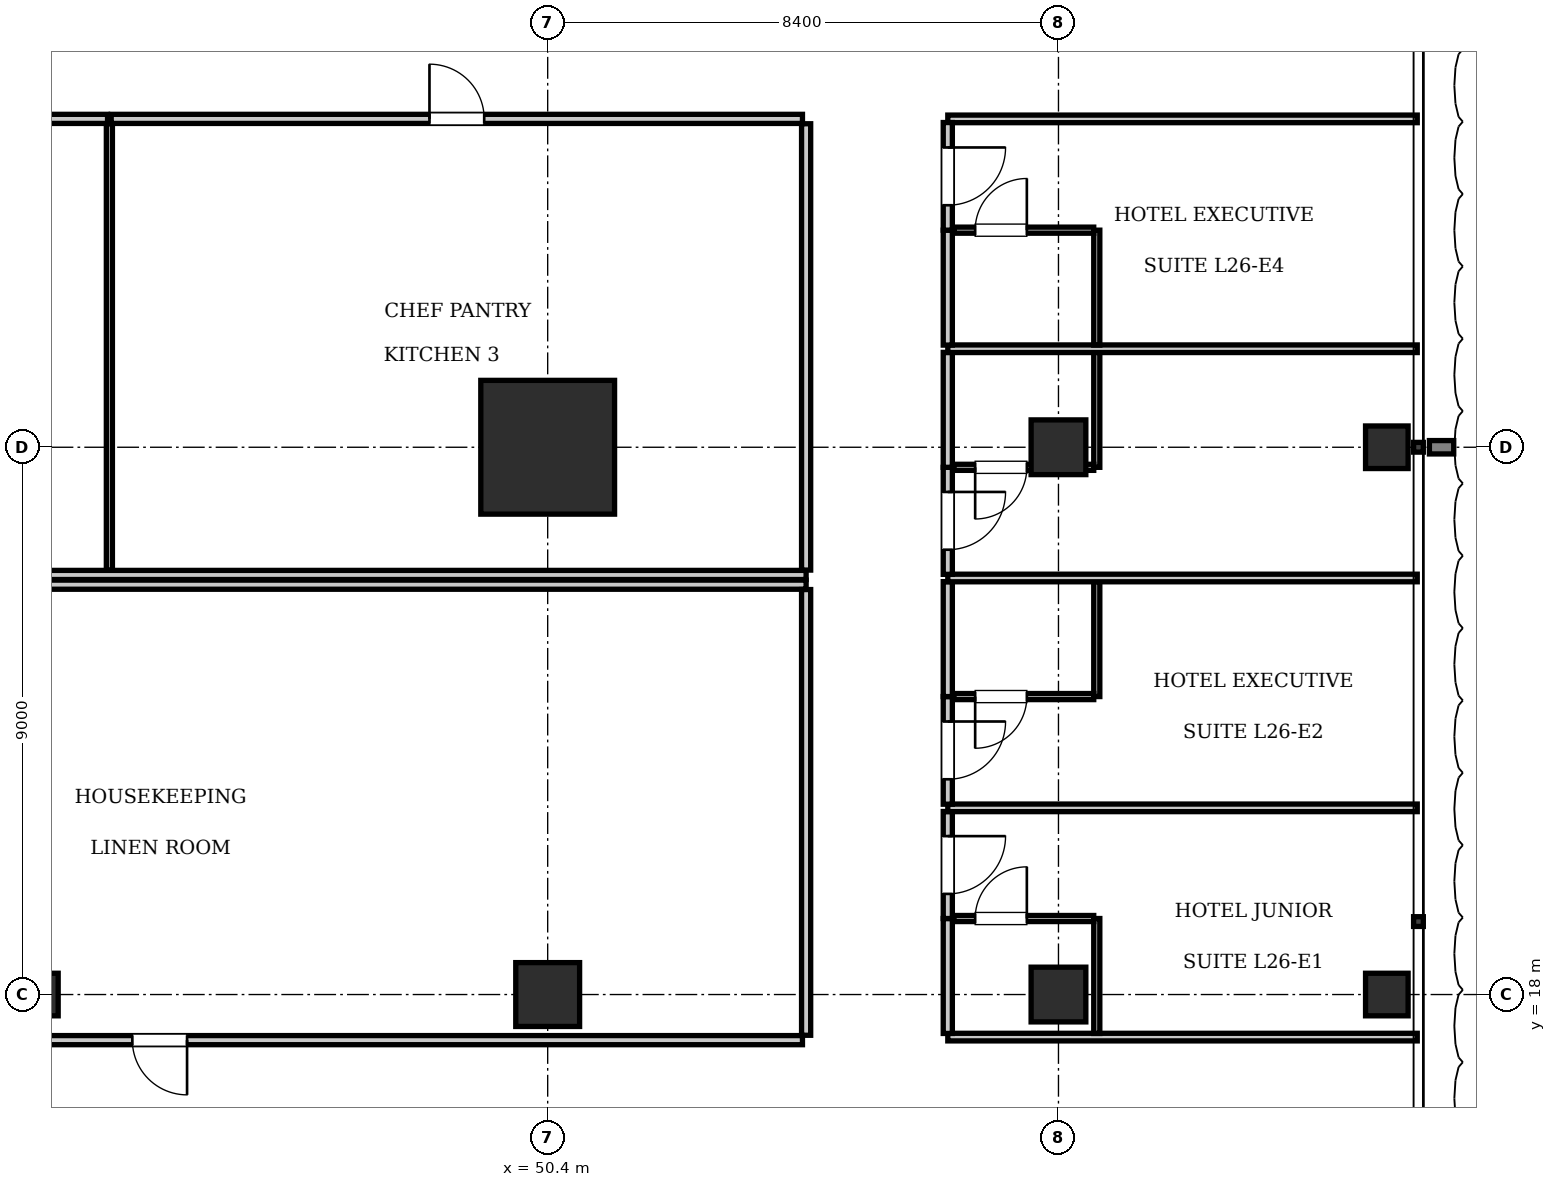
"""IFC4 building model, lengths in metres.
Left out: names, types, materials, properties, quantities, classifications, styles, units other than length and angle.
Written with IfcOpenShell. Run it as: python <this file> out.ifc"""

import sys

from ifc_helpers import new_model, si_unit, direction, frame, frame_2d, origin, origin_2d, place, context, subcontext, project, spatial, rectangle, i_section, extrude, element, fill, save


model = new_model("IFC4")
c1 = context("Model", 3, precision=1e-05, world=origin(), true_north=direction((0.0, 1.0)))
c2 = subcontext(c1, "Body", "Model", "MODEL_VIEW")
j1 = project(units=[si_unit("LENGTHUNIT", "METRE"), si_unit("PLANEANGLEUNIT", "RADIAN")], contexts=[c1])
p1 = place(None, origin())
s1 = spatial("IfcSite", under=j1, at=p1, CompositionType="ELEMENT")
p2 = place(p1, origin())
s2 = spatial("IfcBuilding", under=s1, at=p2, CompositionType="ELEMENT")
p3 = place(p2, frame((0.0, 0.0, 107.8)))
s3 = spatial("IfcBuildingStorey", under=s2, at=p3, CompositionType="ELEMENT", Elevation=107.8)
p4 = place(p3, frame((50.4, 27.0, 0.0), z_axis=(0.0, 0.0, 1.0), x_axis=(1.0, 0.0, 0.0)))
e1 = element("IfcColumn", 1, at=p4, inside=s3, PredefinedType="COLUMN", context=c2, shape_type="SweptSolid", body=[
    extrude(rectangle(XDim=2.2, YDim=2.2, at=origin_2d()), origin(), (0.0, 0.0, 1.0), 3.85),
])
p5 = place(p3, frame((50.4, 18.0, 0.0), z_axis=(0.0, 0.0, 1.0), x_axis=(1.0, 0.0, 0.0)))
e2 = element("IfcColumn", 2, at=p5, inside=s3, PredefinedType="COLUMN", context=c2, shape_type="SweptSolid", body=[
    extrude(rectangle(XDim=1.05, YDim=1.05, at=origin_2d()), origin(), (0.0, 0.0, 1.0), 3.85),
])
p6 = place(p3, frame((42.0, 18.0, 0.0), z_axis=(0.0, 0.0, 1.0), x_axis=(1.0, 0.0, 0.0)))
e3 = element("IfcColumn", 3, at=p6, inside=s3, PredefinedType="COLUMN", context=c2, shape_type="SweptSolid", body=[
    extrude(i_section(OverallWidth=0.7, OverallDepth=0.7, WebThickness=0.028, FlangeThickness=0.044, at=origin_2d()), origin(), (0.0, 0.0, 1.0), 3.85),
])
for number, where, z_axis, x_axis in (
    (4, (58.8, 18.0, 0.0), (0.0, 0.0, 1.0), (1.0, 0.0, 0.0)),
    (5, (58.8, 27.0, 0.0), (0.0, 0.0, 1.0), (1.0, 0.0, 0.0)),
):
    element("IfcColumn", number, at=place(p3, frame(where, z_axis=z_axis, x_axis=x_axis)), inside=s3, PredefinedType="COLUMN", context=c2, shape_type="SweptSolid", body=[
        extrude(rectangle(XDim=0.9, YDim=0.9, at=origin_2d()), origin(), (0.0, 0.0, 1.0), 3.85),
    ])
for number, where, z_axis, x_axis in (
    (6, (64.2, 18.0, 0.0), (0.0, 0.0, 1.0), (1.0, 0.0, 0.0)),
    (7, (64.2, 27.0, 0.0), (0.0, 0.0, 1.0), (1.0, 0.0, 0.0)),
):
    element("IfcColumn", number, at=place(p3, frame(where, z_axis=z_axis, x_axis=x_axis)), inside=s3, PredefinedType="COLUMN", context=c2, shape_type="SweptSolid", body=[
        extrude(i_section(OverallWidth=0.7, OverallDepth=0.7, WebThickness=0.028, FlangeThickness=0.044, at=origin_2d()), origin(), (0.0, 0.0, 1.0), 3.85),
    ])
p7 = place(p3, frame((20.95, 24.9, 0.0), z_axis=(0.0, 0.0, 1.0), x_axis=(1.0, 0.0, 0.0)))
e8 = element("IfcWall", 8, at=p7, inside=s3, PredefinedType="PARTITIONING", context=c2, shape_type="SweptSolid", body=[
    extrude(rectangle(XDim=33.7, YDim=0.15, at=frame_2d((16.85, 0.0))), origin(), (0.0, 0.0, 1.0), 3.61),
])
p8 = place(p3, frame((54.65, 24.98, 0.0), z_axis=(0.0, 0.0, 1.0), x_axis=(0.0, 1.0, 0.0)))
e9 = element("IfcWall", 9, at=p8, inside=s3, PredefinedType="PARTITIONING", context=c2, shape_type="SweptSolid", body=[
    extrude(rectangle(XDim=7.34, YDim=0.15, at=frame_2d((3.67, 0.0))), origin(), (0.0, 0.0, 1.0), 3.3),
])
p9 = place(p3, frame((33.786, 32.4, 0.0), z_axis=(0.0, 0.0, 1.0), x_axis=(1.0, 0.0, 0.0)))
e10 = element("IfcWall", 10, at=p9, inside=s3, PredefinedType="PARTITIONING", context=c2, shape_type="SweptSolid", body=[
    extrude(rectangle(XDim=9.376, YDim=0.15, at=frame_2d((4.688, 0.0))), origin(), (0.0, 0.0, 1.0), 3.61),
])
p10 = place(p9, frame((4.238, 0.0, 0.0)))
e11 = element("IfcOpeningElement", 11, at=p10, cuts=e10, PredefinedType="OPENING", context=c2, shape_type="SweptSolid", body=[
    extrude(rectangle(XDim=0.9, YDim=2.1, at=frame_2d((0.45, 1.05))), frame((0.0, 0.085, 0.0), z_axis=(0.0, -1.0, 0.0), x_axis=(1.0, 0.0, 0.0)), (0.0, 0.0, 1.0), 0.17),
])
p11 = place(p3, frame((43.192, 24.98, 0.0), z_axis=(0.0, 0.0, 1.0), x_axis=(0.0, 1.0, 0.0)))
e12 = element("IfcWall", 12, at=p11, inside=s3, PredefinedType="PARTITIONING", context=c2, shape_type="SweptSolid", body=[
    extrude(rectangle(XDim=7.34, YDim=0.1, at=frame_2d((3.67, 0.0))), origin(), (0.0, 0.0, 1.0), 3.61),
])
p12 = place(p3, frame((43.222, 32.4, 0.0), z_axis=(0.0, 0.0, 1.0), x_axis=(1.0, 0.0, 0.0)))
e13 = element("IfcWall", 13, at=p12, inside=s3, PredefinedType="PARTITIONING", context=c2, shape_type="SweptSolid", body=[
    extrude(rectangle(XDim=11.368, YDim=0.15, at=frame_2d((5.684, 0.0))), origin(), (0.0, 0.0, 1.0), 3.61),
])
p13 = place(p12, frame((5.234, 0.0, 0.0)))
e14 = element("IfcOpeningElement", 14, at=p13, cuts=e13, PredefinedType="OPENING", context=c2, shape_type="SweptSolid", body=[
    extrude(rectangle(XDim=0.9, YDim=2.1, at=frame_2d((0.45, 1.05))), frame((0.0, 0.085, 0.0), z_axis=(0.0, -1.0, 0.0), x_axis=(1.0, 0.0, 0.0)), (0.0, 0.0, 1.0), 0.17),
])
p14 = place(p3, frame((20.95, 24.74, 0.0), z_axis=(0.0, 0.0, 1.0), x_axis=(1.0, 0.0, 0.0)))
e15 = element("IfcWall", 15, at=p14, inside=s3, PredefinedType="PARTITIONING", context=c2, shape_type="SweptSolid", body=[
    extrude(rectangle(XDim=33.7, YDim=0.15, at=frame_2d((16.85, 0.0))), origin(), (0.0, 0.0, 1.0), 3.61),
])
p15 = place(p3, frame((54.65, 17.33, 0.0), z_axis=(0.0, 0.0, 1.0), x_axis=(0.0, 1.0, 0.0)))
e16 = element("IfcWall", 16, at=p15, inside=s3, PredefinedType="PARTITIONING", context=c2, shape_type="SweptSolid", body=[
    extrude(rectangle(XDim=7.33, YDim=0.15, at=frame_2d((3.665, 0.0))), origin(), (0.0, 0.0, 1.0), 3.293),
])
p16 = place(p3, frame((33.449, 17.25, 0.0), z_axis=(0.0, 0.0, 1.0), x_axis=(1.0, 0.0, 0.0)))
e17 = element("IfcWall", 17, at=p16, inside=s3, PredefinedType="PARTITIONING", context=c2, shape_type="SweptSolid", body=[
    extrude(rectangle(XDim=21.141, YDim=0.15, at=frame_2d((10.571, 0.0))), origin(), (0.0, 0.0, 1.0), 3.61),
])
p17 = place(p16, frame((10.121, 0.0, 0.0)))
e18 = element("IfcOpeningElement", 18, at=p17, cuts=e17, PredefinedType="OPENING", context=c2, shape_type="SweptSolid", body=[
    extrude(rectangle(XDim=0.9, YDim=2.1, at=frame_2d((0.45, 1.05))), frame((0.0, 0.085, 0.0), z_axis=(0.0, -1.0, 0.0), x_axis=(1.0, 0.0, 0.0)), (0.0, 0.0, 1.0), 0.17),
])
for number, where, z_axis, x_axis in (
    (19, (56.98, 17.3, 0.0), (0.0, 0.0, 1.0), (1.0, 0.0, 0.0)),
    (20, (56.98, 32.4, 0.0), (0.0, 0.0, 1.0), (1.0, 0.0, 0.0)),
):
    element("IfcWall", number, at=place(p3, frame(where, z_axis=z_axis, x_axis=x_axis)), inside=s3, PredefinedType="PARTITIONING", context=c2, shape_type="SweptSolid", body=[
        extrude(rectangle(XDim=7.72, YDim=0.125, at=frame_2d((3.86, 0.0))), origin(), (0.0, 0.0, 1.0), 3.61),
    ])
p18 = place(p3, frame((56.98, 17.36, 0.0), z_axis=(0.0, 0.0, 1.0), x_axis=(0.0, 1.0, 0.0)))
e21 = element("IfcWall", 21, at=p18, inside=s3, PredefinedType="PARTITIONING", context=c2, shape_type="SweptSolid", body=[
    extrude(rectangle(XDim=1.89, YDim=0.15, at=frame_2d((0.945, 0.0))), origin(), (0.0, 0.0, 1.0), 3.61),
])
p19 = place(p3, frame((56.98, 19.25, 0.0), z_axis=(0.0, 0.0, 1.0), x_axis=(0.0, 1.0, 0.0)))
e22 = element("IfcWall", 22, at=p19, inside=s3, PredefinedType="PARTITIONING", context=c2, shape_type="SweptSolid", body=[
    extrude(rectangle(XDim=1.76, YDim=0.15, at=frame_2d((0.88, 0.0))), origin(), (0.0, 0.0, 1.0), 3.61),
])
p20 = place(p19, frame((0.405, 0.0, 0.0)))
e23 = element("IfcOpeningElement", 23, at=p20, cuts=e22, PredefinedType="OPENING", context=c2, shape_type="SweptSolid", body=[
    extrude(rectangle(XDim=0.95, YDim=2.15, at=frame_2d((0.475, 1.075))), frame((0.0, 0.085, 0.0), z_axis=(0.0, -1.0, 0.0), x_axis=(1.0, 0.0, 0.0)), (0.0, 0.0, 1.0), 0.17),
])
p21 = place(p3, frame((59.43, 17.36, 0.0), z_axis=(0.0, 0.0, 1.0), x_axis=(0.0, 1.0, 0.0)))
e24 = element("IfcWall", 24, at=p21, inside=s3, PredefinedType="PARTITIONING", context=c2, shape_type="SweptSolid", body=[
    extrude(rectangle(XDim=1.89, YDim=0.1, at=frame_2d((0.945, 0.0))), origin(), (0.0, 0.0, 1.0), 3.61),
])
p22 = place(p3, frame((57.08, 19.25, 0.0), z_axis=(0.0, 0.0, 1.0), x_axis=(1.0, 0.0, 0.0)))
e25 = element("IfcWall", 25, at=p22, inside=s3, PredefinedType="PARTITIONING", context=c2, shape_type="SweptSolid", body=[
    extrude(rectangle(XDim=2.3, YDim=0.1, at=frame_2d((1.15, 0.0))), origin(), (0.0, 0.0, 1.0), 3.61),
])
p23 = place(p22, frame((0.35, 0.0, 0.0)))
e26 = element("IfcOpeningElement", 26, at=p23, cuts=e25, PredefinedType="OPENING", context=c2, shape_type="SweptSolid", body=[
    extrude(rectangle(XDim=0.85, YDim=2.1, at=frame_2d((0.425, 1.05))), frame((0.0, 0.06, 0.0), z_axis=(0.0, -1.0, 0.0), x_axis=(1.0, 0.0, 0.0)), (0.0, 0.0, 1.0), 0.12),
])
p24 = place(p3, frame((56.98, 21.07, 0.0), z_axis=(0.0, 0.0, 1.0), x_axis=(1.0, 0.0, 0.0)))
e27 = element("IfcWall", 27, at=p24, inside=s3, PredefinedType="PARTITIONING", context=c2, shape_type="SweptSolid", body=[
    extrude(rectangle(XDim=7.72, YDim=0.125, at=frame_2d((3.86, 0.0))), origin(), (0.0, 0.0, 1.0), 3.61),
])
p25 = place(p3, frame((56.98, 21.13, 0.0), z_axis=(0.0, 0.0, 1.0), x_axis=(0.0, 1.0, 0.0)))
e28 = element("IfcWall", 28, at=p25, inside=s3, PredefinedType="PARTITIONING", context=c2, shape_type="SweptSolid", body=[
    extrude(rectangle(XDim=1.77, YDim=0.15, at=frame_2d((0.885, 0.0))), origin(), (0.0, 0.0, 1.0), 3.61),
])
p26 = place(p25, frame((0.41, 0.0, 0.0)))
e29 = element("IfcOpeningElement", 29, at=p26, cuts=e28, PredefinedType="OPENING", context=c2, shape_type="SweptSolid", body=[
    extrude(rectangle(XDim=0.95, YDim=2.15, at=frame_2d((0.475, 1.075))), frame((0.0, 0.085, 0.0), z_axis=(0.0, -1.0, 0.0), x_axis=(1.0, 0.0, 0.0)), (0.0, 0.0, 1.0), 0.17),
])
p27 = place(p3, frame((56.98, 22.9, 0.0), z_axis=(0.0, 0.0, 1.0), x_axis=(0.0, 1.0, 0.0)))
e30 = element("IfcWall", 30, at=p27, inside=s3, PredefinedType="PARTITIONING", context=c2, shape_type="SweptSolid", body=[
    extrude(rectangle(XDim=1.89, YDim=0.15, at=frame_2d((0.945, 0.0))), origin(), (0.0, 0.0, 1.0), 3.61),
])
p28 = place(p3, frame((59.43, 22.9, 0.0), z_axis=(0.0, 0.0, 1.0), x_axis=(0.0, 1.0, 0.0)))
e31 = element("IfcWall", 31, at=p28, inside=s3, PredefinedType="PARTITIONING", context=c2, shape_type="SweptSolid", body=[
    extrude(rectangle(XDim=1.89, YDim=0.1, at=frame_2d((0.945, 0.0))), origin(), (0.0, 0.0, 1.0), 3.61),
])
p29 = place(p3, frame((57.08, 22.9, 0.0), z_axis=(0.0, 0.0, 1.0), x_axis=(1.0, 0.0, 0.0)))
e32 = element("IfcWall", 32, at=p29, inside=s3, PredefinedType="PARTITIONING", context=c2, shape_type="SweptSolid", body=[
    extrude(rectangle(XDim=2.3, YDim=0.1, at=frame_2d((1.15, 0.0))), origin(), (0.0, 0.0, 1.0), 3.61),
])
p30 = place(p29, frame((0.35, 0.0, 0.0)))
e33 = element("IfcOpeningElement", 33, at=p30, cuts=e32, PredefinedType="OPENING", context=c2, shape_type="SweptSolid", body=[
    extrude(rectangle(XDim=0.85, YDim=2.1, at=frame_2d((0.425, 1.05))), frame((0.0, 0.06, 0.0), z_axis=(0.0, -1.0, 0.0), x_axis=(1.0, 0.0, 0.0)), (0.0, 0.0, 1.0), 0.12),
])
p31 = place(p3, frame((56.98, 24.85, 0.0), z_axis=(0.0, 0.0, 1.0), x_axis=(1.0, 0.0, 0.0)))
e34 = element("IfcWall", 34, at=p31, inside=s3, PredefinedType="PARTITIONING", context=c2, shape_type="SweptSolid", body=[
    extrude(rectangle(XDim=7.72, YDim=0.125, at=frame_2d((3.86, 0.0))), origin(), (0.0, 0.0, 1.0), 3.61),
])
p32 = place(p3, frame((56.98, 24.91, 0.0), z_axis=(0.0, 0.0, 1.0), x_axis=(0.0, 1.0, 0.0)))
e35 = element("IfcWall", 35, at=p32, inside=s3, PredefinedType="PARTITIONING", context=c2, shape_type="SweptSolid", body=[
    extrude(rectangle(XDim=1.76, YDim=0.15, at=frame_2d((0.88, 0.0))), origin(), (0.0, 0.0, 1.0), 3.61),
])
p33 = place(p32, frame((0.405, 0.0, 0.0)))
e36 = element("IfcOpeningElement", 36, at=p33, cuts=e35, PredefinedType="OPENING", context=c2, shape_type="SweptSolid", body=[
    extrude(rectangle(XDim=0.95, YDim=2.15, at=frame_2d((0.475, 1.075))), frame((0.0, 0.085, 0.0), z_axis=(0.0, -1.0, 0.0), x_axis=(1.0, 0.0, 0.0)), (0.0, 0.0, 1.0), 0.17),
])
p34 = place(p3, frame((56.98, 26.67, 0.0), z_axis=(0.0, 0.0, 1.0), x_axis=(0.0, 1.0, 0.0)))
e37 = element("IfcWall", 37, at=p34, inside=s3, PredefinedType="PARTITIONING", context=c2, shape_type="SweptSolid", body=[
    extrude(rectangle(XDim=1.89, YDim=0.15, at=frame_2d((0.945, 0.0))), origin(), (0.0, 0.0, 1.0), 3.61),
])
p35 = place(p3, frame((59.43, 26.67, 0.0), z_axis=(0.0, 0.0, 1.0), x_axis=(0.0, 1.0, 0.0)))
e38 = element("IfcWall", 38, at=p35, inside=s3, PredefinedType="PARTITIONING", context=c2, shape_type="SweptSolid", body=[
    extrude(rectangle(XDim=1.89, YDim=0.1, at=frame_2d((0.945, 0.0))), origin(), (0.0, 0.0, 1.0), 3.61),
])
p36 = place(p3, frame((57.08, 26.67, 0.0), z_axis=(0.0, 0.0, 1.0), x_axis=(1.0, 0.0, 0.0)))
e39 = element("IfcWall", 39, at=p36, inside=s3, PredefinedType="PARTITIONING", context=c2, shape_type="SweptSolid", body=[
    extrude(rectangle(XDim=2.3, YDim=0.1, at=frame_2d((1.15, 0.0))), origin(), (0.0, 0.0, 1.0), 3.61),
])
p37 = place(p36, frame((0.35, 0.0, 0.0)))
e40 = element("IfcOpeningElement", 40, at=p37, cuts=e39, PredefinedType="OPENING", context=c2, shape_type="SweptSolid", body=[
    extrude(rectangle(XDim=0.85, YDim=2.1, at=frame_2d((0.425, 1.05))), frame((0.0, 0.06, 0.0), z_axis=(0.0, -1.0, 0.0), x_axis=(1.0, 0.0, 0.0)), (0.0, 0.0, 1.0), 0.12),
])
p38 = place(p3, frame((56.98, 28.62, 0.0), z_axis=(0.0, 0.0, 1.0), x_axis=(1.0, 0.0, 0.0)))
e41 = element("IfcWall", 41, at=p38, inside=s3, PredefinedType="PARTITIONING", context=c2, shape_type="SweptSolid", body=[
    extrude(rectangle(XDim=7.72, YDim=0.125, at=frame_2d((3.86, 0.0))), origin(), (0.0, 0.0, 1.0), 3.61),
])
p39 = place(p3, frame((56.98, 28.68, 0.0), z_axis=(0.0, 0.0, 1.0), x_axis=(0.0, 1.0, 0.0)))
e42 = element("IfcWall", 42, at=p39, inside=s3, PredefinedType="PARTITIONING", context=c2, shape_type="SweptSolid", body=[
    extrude(rectangle(XDim=1.89, YDim=0.15, at=frame_2d((0.945, 0.0))), origin(), (0.0, 0.0, 1.0), 3.61),
])
p40 = place(p3, frame((56.98, 30.57, 0.0), z_axis=(0.0, 0.0, 1.0), x_axis=(0.0, 1.0, 0.0)))
e43 = element("IfcWall", 43, at=p40, inside=s3, PredefinedType="PARTITIONING", context=c2, shape_type="SweptSolid", body=[
    extrude(rectangle(XDim=1.77, YDim=0.15, at=frame_2d((0.885, 0.0))), origin(), (0.0, 0.0, 1.0), 3.61),
])
p41 = place(p40, frame((0.41, 0.0, 0.0)))
e44 = element("IfcOpeningElement", 44, at=p41, cuts=e43, PredefinedType="OPENING", context=c2, shape_type="SweptSolid", body=[
    extrude(rectangle(XDim=0.95, YDim=2.15, at=frame_2d((0.475, 1.075))), frame((0.0, 0.085, 0.0), z_axis=(0.0, -1.0, 0.0), x_axis=(1.0, 0.0, 0.0)), (0.0, 0.0, 1.0), 0.17),
])
p42 = place(p3, frame((59.43, 28.68, 0.0), z_axis=(0.0, 0.0, 1.0), x_axis=(0.0, 1.0, 0.0)))
e45 = element("IfcWall", 45, at=p42, inside=s3, PredefinedType="PARTITIONING", context=c2, shape_type="SweptSolid", body=[
    extrude(rectangle(XDim=1.89, YDim=0.1, at=frame_2d((0.945, 0.0))), origin(), (0.0, 0.0, 1.0), 3.61),
])
p43 = place(p3, frame((57.08, 30.57, 0.0), z_axis=(0.0, 0.0, 1.0), x_axis=(1.0, 0.0, 0.0)))
e46 = element("IfcWall", 46, at=p43, inside=s3, PredefinedType="PARTITIONING", context=c2, shape_type="SweptSolid", body=[
    extrude(rectangle(XDim=2.3, YDim=0.1, at=frame_2d((1.15, 0.0))), origin(), (0.0, 0.0, 1.0), 3.61),
])
p44 = place(p43, frame((0.35, 0.0, 0.0)))
e47 = element("IfcOpeningElement", 47, at=p44, cuts=e46, PredefinedType="OPENING", context=c2, shape_type="SweptSolid", body=[
    extrude(rectangle(XDim=0.85, YDim=2.1, at=frame_2d((0.425, 1.05))), frame((0.0, 0.06, 0.0), z_axis=(0.0, -1.0, 0.0), x_axis=(1.0, 0.0, 0.0)), (0.0, 0.0, 1.0), 0.12),
])
p45 = place(p13, origin())
e48 = element("IfcDoor", 48, at=p45, inside=s3, OperationType="SINGLE_SWING_LEFT", PredefinedType="DOOR", context=c2, shape_type="SweptSolid", body=[
    extrude(rectangle(XDim=0.9, YDim=2.1, at=frame_2d((0.45, 1.05))), frame((0.0, 0.025, 0.0), z_axis=(0.0, -1.0, 0.0), x_axis=(1.0, 0.0, 0.0)), (0.0, 0.0, 1.0), 0.05),
])
fill(e14, e48)
p46 = place(p17, frame((0.9, 0.0, 0.0), z_axis=(0.0, 0.0, 1.0), x_axis=(-1.0, 0.0, 0.0)))
e49 = element("IfcDoor", 49, at=p46, inside=s3, OperationType="SINGLE_SWING_LEFT", PredefinedType="DOOR", context=c2, shape_type="SweptSolid", body=[
    extrude(rectangle(XDim=0.9, YDim=2.1, at=frame_2d((0.45, 1.05))), frame((0.0, 0.025, 0.0), z_axis=(0.0, -1.0, 0.0), x_axis=(1.0, 0.0, 0.0)), (0.0, 0.0, 1.0), 0.05),
])
fill(e18, e49)
p47 = place(p23, origin())
e50 = element("IfcDoor", 50, at=p47, inside=s3, OperationType="SINGLE_SWING_RIGHT", PredefinedType="DOOR", context=c2, shape_type="SweptSolid", body=[
    extrude(rectangle(XDim=0.85, YDim=2.1, at=frame_2d((0.425, 1.05))), frame((0.0, 0.025, 0.0), z_axis=(0.0, -1.0, 0.0), x_axis=(1.0, 0.0, 0.0)), (0.0, 0.0, 1.0), 0.05),
])
fill(e26, e50)
p48 = place(p20, frame((0.95, 0.0, 0.0), z_axis=(0.0, 0.0, 1.0), x_axis=(-1.0, 0.0, 0.0)))
e51 = element("IfcDoor", 51, at=p48, inside=s3, OperationType="SINGLE_SWING_LEFT", PredefinedType="DOOR", context=c2, shape_type="SweptSolid", body=[
    extrude(rectangle(XDim=0.95, YDim=2.15, at=frame_2d((0.475, 1.075))), frame((0.0, 0.025, 0.0), z_axis=(0.0, -1.0, 0.0), x_axis=(1.0, 0.0, 0.0)), (0.0, 0.0, 1.0), 0.05),
])
fill(e23, e51)
p49 = place(p30, frame((0.85, 0.0, 0.0), z_axis=(0.0, 0.0, 1.0), x_axis=(-1.0, 0.0, 0.0)))
e52 = element("IfcDoor", 52, at=p49, inside=s3, OperationType="SINGLE_SWING_RIGHT", PredefinedType="DOOR", context=c2, shape_type="SweptSolid", body=[
    extrude(rectangle(XDim=0.85, YDim=2.1, at=frame_2d((0.425, 1.05))), frame((0.0, 0.025, 0.0), z_axis=(0.0, -1.0, 0.0), x_axis=(1.0, 0.0, 0.0)), (0.0, 0.0, 1.0), 0.05),
])
fill(e33, e52)
p50 = place(p26, frame((0.95, 0.0, 0.0), z_axis=(0.0, 0.0, 1.0), x_axis=(-1.0, 0.0, 0.0)))
e53 = element("IfcDoor", 53, at=p50, inside=s3, OperationType="SINGLE_SWING_LEFT", PredefinedType="DOOR", context=c2, shape_type="SweptSolid", body=[
    extrude(rectangle(XDim=0.95, YDim=2.15, at=frame_2d((0.475, 1.075))), frame((0.0, 0.025, 0.0), z_axis=(0.0, -1.0, 0.0), x_axis=(1.0, 0.0, 0.0)), (0.0, 0.0, 1.0), 0.05),
])
fill(e29, e53)
p51 = place(p37, frame((0.85, 0.0, 0.0), z_axis=(0.0, 0.0, 1.0), x_axis=(-1.0, 0.0, 0.0)))
e54 = element("IfcDoor", 54, at=p51, inside=s3, OperationType="SINGLE_SWING_RIGHT", PredefinedType="DOOR", context=c2, shape_type="SweptSolid", body=[
    extrude(rectangle(XDim=0.85, YDim=2.1, at=frame_2d((0.425, 1.05))), frame((0.0, 0.025, 0.0), z_axis=(0.0, -1.0, 0.0), x_axis=(1.0, 0.0, 0.0)), (0.0, 0.0, 1.0), 0.05),
])
fill(e40, e54)
p52 = place(p33, frame((0.95, 0.0, 0.0), z_axis=(0.0, 0.0, 1.0), x_axis=(-1.0, 0.0, 0.0)))
e55 = element("IfcDoor", 55, at=p52, inside=s3, OperationType="SINGLE_SWING_LEFT", PredefinedType="DOOR", context=c2, shape_type="SweptSolid", body=[
    extrude(rectangle(XDim=0.95, YDim=2.15, at=frame_2d((0.475, 1.075))), frame((0.0, 0.025, 0.0), z_axis=(0.0, -1.0, 0.0), x_axis=(1.0, 0.0, 0.0)), (0.0, 0.0, 1.0), 0.05),
])
fill(e36, e55)
p53 = place(p44, origin())
e56 = element("IfcDoor", 56, at=p53, inside=s3, OperationType="SINGLE_SWING_RIGHT", PredefinedType="DOOR", context=c2, shape_type="SweptSolid", body=[
    extrude(rectangle(XDim=0.85, YDim=2.1, at=frame_2d((0.425, 1.05))), frame((0.0, 0.025, 0.0), z_axis=(0.0, -1.0, 0.0), x_axis=(1.0, 0.0, 0.0)), (0.0, 0.0, 1.0), 0.05),
])
fill(e47, e56)
p54 = place(p41, frame((0.95, 0.0, 0.0), z_axis=(0.0, 0.0, 1.0), x_axis=(-1.0, 0.0, 0.0)))
e57 = element("IfcDoor", 57, at=p54, inside=s3, OperationType="SINGLE_SWING_LEFT", PredefinedType="DOOR", context=c2, shape_type="SweptSolid", body=[
    extrude(rectangle(XDim=0.95, YDim=2.15, at=frame_2d((0.475, 1.075))), frame((0.0, 0.025, 0.0), z_axis=(0.0, -1.0, 0.0), x_axis=(1.0, 0.0, 0.0)), (0.0, 0.0, 1.0), 0.05),
])
fill(e44, e57)
save(model, sys.argv[1])
